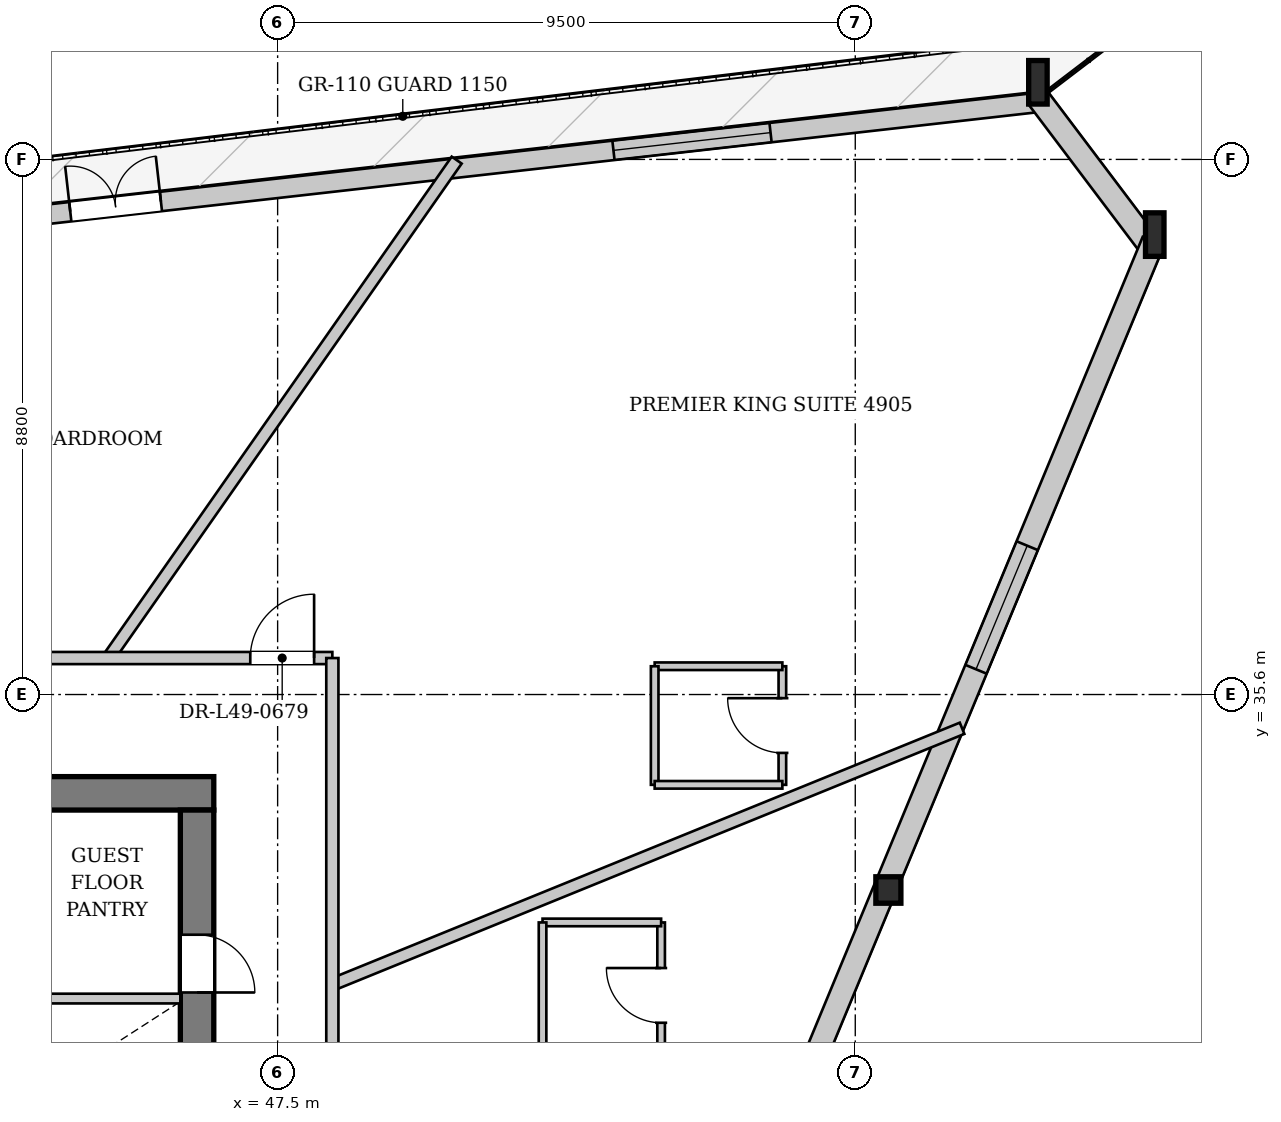
"""IFC4 building model, lengths in metres.
Left out: names, types, materials, properties, quantities, classifications, styles, units other than length and angle.
Written with IfcOpenShell. Run it as: python <this file> out.ifc"""

import sys

from ifc_helpers import new_model, si_unit, direction, frame, frame_2d, origin, origin_2d, place, context, subcontext, project, spatial, rectangle, i_section, extrude, source, transform, mapped, element, fill, save


model = new_model("IFC4")
c1 = context("Model", 3, precision=1e-05, world=origin(), true_north=direction((0.0, 1.0)))
c2 = subcontext(c1, "Body", "Model", "MODEL_VIEW")
j1 = project(units=[si_unit("LENGTHUNIT", "METRE"), si_unit("PLANEANGLEUNIT", "RADIAN")], contexts=[c1])
p1 = place(None, origin())
s1 = spatial("IfcSite", under=j1, at=p1, CompositionType="ELEMENT")
p2 = place(p1, origin())
s2 = spatial("IfcBuilding", under=s1, at=p2, CompositionType="ELEMENT")
p3 = place(p2, frame((0.0, 0.0, 185.65)))
s3 = spatial("IfcBuildingStorey", under=s2, at=p3, CompositionType="ELEMENT", Elevation=185.65)
m1 = source(origin(), c2, "Body", "SweptSolid", [
    extrude(i_section(OverallWidth=0.304, OverallDepth=0.716, WebThickness=0.021, FlangeThickness=0.04, at=origin_2d()), origin(), (0.0, 0.0, 1.0), 3.418),
])
p4 = place(p3, frame((62.079, 42.982, 0.0), z_axis=(-0.089706079585, 0.106418836451, 0.990266555294), x_axis=(-0.764591737576, -0.644514914359, 0.0)))
e1 = element("IfcColumn", 1, at=p4, inside=s3, PredefinedType="COLUMN", context=c2, shape_type="MappedRepresentation", body=[
    mapped(m1, transform((0.0, 0.0, 0.0), x_axis=(1.0, 0.0, 0.0), y_axis=(0.0, 1.0, 0.0), z_axis=(0.0, 0.0, 1.0), scale=1.0)),
])
m2 = source(origin(), c2, "Body", "SweptSolid", [
    extrude(i_section(OverallWidth=0.304, OverallDepth=0.716, WebThickness=0.021, FlangeThickness=0.04, at=origin_2d()), origin(), (0.0, 0.0, 1.0), 3.414),
])
p5 = place(p3, frame((60.165, 45.517, 0.0), z_axis=(-0.094542362552, 0.08882119084, 0.991550572458), x_axis=(-0.684710959005, -0.72881472448, 0.0)))
e2 = element("IfcColumn", 2, at=p5, inside=s3, PredefinedType="COLUMN", context=c2, shape_type="MappedRepresentation", body=[
    mapped(m2, transform((0.0, 0.0, 0.0), x_axis=(1.0, 0.0, 0.0), y_axis=(0.0, 1.0, 0.0), z_axis=(0.0, 0.0, 1.0), scale=1.0)),
])
m3 = source(origin(), c2, "Body", "SweptSolid", [
    extrude(i_section(OverallWidth=0.412, OverallDepth=0.435, WebThickness=0.031, FlangeThickness=0.05, at=origin_2d()), origin(), (0.0, 0.0, 1.0), 3.403),
])
p6 = place(p3, frame((57.621, 32.226, 0.0), z_axis=(-0.045049424917, 0.093470383228, 0.99460235108), x_axis=(-0.900831457079, -0.434168960127, 0.0)))
e3 = element("IfcColumn", 3, at=p6, inside=s3, PredefinedType="COLUMN", context=c2, shape_type="MappedRepresentation", body=[
    mapped(m3, transform((0.0, 0.0, 0.0), x_axis=(1.0, 0.0, 0.0), y_axis=(0.0, 1.0, 0.0), z_axis=(0.0, 0.0, 1.0), scale=1.0)),
])
p7 = place(p3, frame((37.612, 42.808, 0.0), z_axis=(0.0, 0.0, 1.0), x_axis=(0.993680751004, 0.112243329794, 0.0)))
e4 = element("IfcWall", 4, at=p7, inside=s3, PredefinedType="SOLIDWALL", context=c2, shape_type="SweptSolid", body=[
    extrude(rectangle(XDim=22.715, YDim=0.32, at=frame_2d((11.357, 0.0))), origin(), (0.0, 0.0, 1.0), 2.722),
])
p8 = place(p7, frame((6.519, 0.0, 0.0)))
e5 = element("IfcOpeningElement", 5, at=p8, cuts=e4, PredefinedType="OPENING", context=c2, shape_type="SweptSolid", body=[
    extrude(rectangle(XDim=1.5, YDim=2.3, at=frame_2d((0.75, 1.15))), frame((0.0, 0.17, 0.0), z_axis=(0.0, -1.0, 0.0), x_axis=(1.0, 0.0, 0.0)), (0.0, 0.0, 1.0), 0.34),
])
p9 = place(p7, frame((15.509, 0.0, 0.252)))
e6 = element("IfcOpeningElement", 6, at=p9, cuts=e4, PredefinedType="OPENING", context=c2, shape_type="SweptSolid", body=[
    extrude(rectangle(XDim=2.6, YDim=2.35, at=frame_2d((1.3, 1.175))), frame((0.0, 0.17, 0.0), z_axis=(0.0, -1.0, 0.0), x_axis=(1.0, 0.0, 0.0)), (0.0, 0.0, 1.0), 0.34),
])
p10 = place(p3, frame((60.014, 45.402, 0.0), z_axis=(0.0, 0.0, 1.0), x_axis=(0.602530725423, -0.79809568657, 0.0)))
e7 = element("IfcWall", 7, at=p10, inside=s3, PredefinedType="SOLIDWALL", context=c2, shape_type="SweptSolid", body=[
    extrude(rectangle(XDim=3.176, YDim=0.38, at=frame_2d((1.588, 0.0))), origin(), (0.0, 0.0, 1.0), 2.722),
])
p11 = place(p3, frame((61.903, 43.055, 0.0), z_axis=(0.0, 0.0, 1.0), x_axis=(-0.382868163496, -0.923802992732, 0.0)))
e8 = element("IfcWall", 8, at=p11, inside=s3, PredefinedType="SOLIDWALL", context=c2, shape_type="SweptSolid", body=[
    extrude(rectangle(XDim=23.285, YDim=0.38, at=frame_2d((11.643, 0.0))), origin(), (0.0, 0.0, 1.0), 2.722),
])
p12 = place(p11, frame((5.42, 0.0, 0.352)))
e9 = element("IfcOpeningElement", 9, at=p12, cuts=e8, PredefinedType="OPENING", context=c2, shape_type="SweptSolid", body=[
    extrude(rectangle(XDim=2.2, YDim=2.25, at=frame_2d((1.1, 1.125))), frame((0.0, 0.2, 0.0), z_axis=(0.0, -1.0, 0.0), x_axis=(1.0, 0.0, 0.0)), (0.0, 0.0, 1.0), 0.4),
])
p13 = place(p11, frame((15.665, 0.0, 0.352)))
e10 = element("IfcOpeningElement", 10, at=p13, cuts=e8, PredefinedType="OPENING", context=c2, shape_type="SweptSolid", body=[
    extrude(rectangle(XDim=2.2, YDim=2.25, at=frame_2d((1.1, 1.125))), frame((0.0, 0.2, 0.0), z_axis=(0.0, -1.0, 0.0), x_axis=(1.0, 0.0, 0.0)), (0.0, 0.0, 1.0), 0.4),
])
p14 = place(p3, frame((29.55, 33.975, 0.0), z_axis=(0.0, 0.0, 1.0), x_axis=(1.0, 0.0, 0.0)))
e11 = element("IfcWall", 11, at=p14, inside=s3, PredefinedType="SHEAR", context=c2, shape_type="SweptSolid", body=[
    extrude(rectangle(XDim=16.9, YDim=0.55, at=frame_2d((8.45, 0.0))), origin(), (0.0, 0.0, 1.0), 3.33),
])
p15 = place(p14, frame((1.55, 0.0, 0.0)))
e12 = element("IfcOpeningElement", 12, at=p15, cuts=e11, PredefinedType="OPENING", context=c2, shape_type="SweptSolid", body=[
    extrude(rectangle(XDim=0.95, YDim=2.1, at=frame_2d((0.475, 1.05))), frame((0.0, 0.285, 0.0), z_axis=(0.0, -1.0, 0.0), x_axis=(1.0, 0.0, 0.0)), (0.0, 0.0, 1.0), 0.57),
])
p16 = place(p14, frame((3.93, 0.0, 0.0)))
e13 = element("IfcOpeningElement", 13, at=p16, cuts=e11, PredefinedType="OPENING", context=c2, shape_type="SweptSolid", body=[
    extrude(rectangle(XDim=1.32, YDim=2.2, at=frame_2d((0.66, 1.1))), frame((0.0, 0.285, 0.0), z_axis=(0.0, -1.0, 0.0), x_axis=(1.0, 0.0, 0.0)), (0.0, 0.0, 1.0), 0.57),
])
p17 = place(p3, frame((46.175, 33.7, 0.0), z_axis=(0.0, 0.0, 1.0), x_axis=(0.0, -1.0, 0.0)))
e14 = element("IfcWall", 14, at=p17, inside=s3, PredefinedType="SHEAR", context=c2, shape_type="SweptSolid", body=[
    extrude(rectangle(XDim=14.2, YDim=0.55, at=frame_2d((7.1, 0.0))), origin(), (0.0, 0.0, 1.0), 3.33),
])
p18 = place(p17, frame((5.18, 0.0, 0.0)))
e15 = element("IfcOpeningElement", 15, at=p18, cuts=e14, PredefinedType="OPENING", context=c2, shape_type="SweptSolid", body=[
    extrude(rectangle(XDim=1.6, YDim=2.2, at=frame_2d((0.8, 1.1))), frame((0.0, 0.285, 0.0), z_axis=(0.0, -1.0, 0.0), x_axis=(1.0, 0.0, 0.0)), (0.0, 0.0, 1.0), 0.57),
])
p19 = place(p17, frame((2.05, 0.0, 0.0)))
e16 = element("IfcOpeningElement", 16, at=p19, cuts=e14, PredefinedType="OPENING", context=c2, shape_type="SweptSolid", body=[
    extrude(rectangle(XDim=0.95, YDim=2.1, at=frame_2d((0.475, 1.05))), frame((0.0, 0.285, 0.0), z_axis=(0.0, -1.0, 0.0), x_axis=(1.0, 0.0, 0.0)), (0.0, 0.0, 1.0), 0.57),
])
p20 = place(p3, frame((40.72, 30.6, 0.0), z_axis=(0.0, 0.0, 1.0), x_axis=(1.0, 0.0, 0.0)))
e17 = element("IfcWall", 17, at=p20, inside=s3, PredefinedType="PARTITIONING", context=c2, shape_type="SweptSolid", body=[
    extrude(rectangle(XDim=5.18, YDim=0.16, at=frame_2d((2.59, 0.0))), origin(), (0.0, 0.0, 1.0), 3.33),
])
p21 = place(p3, frame((48.4, 30.831, 0.0), z_axis=(0.0, 0.0, 1.0), x_axis=(0.926275636958, 0.376846712042, 0.0)))
e18 = element("IfcWall", 18, at=p21, inside=s3, PredefinedType="PARTITIONING", context=c2, shape_type="SweptSolid", body=[
    extrude(rectangle(XDim=11.181, YDim=0.2, at=frame_2d((5.591, 0.0))), origin(), (0.0, 0.0, 1.0), 3.33),
])
p22 = place(p3, frame((44.716, 36.2, 0.0), z_axis=(0.0, 0.0, 1.0), x_axis=(0.573232775322, 0.819392570931, 0.0)))
e19 = element("IfcWall", 19, at=p22, inside=s3, PredefinedType="PARTITIONING", context=c2, shape_type="SweptSolid", body=[
    extrude(rectangle(XDim=9.993, YDim=0.2, at=frame_2d((4.997, 0.0))), origin(), (0.0, 0.0, 1.0), 3.33),
])
p23 = place(p3, frame((53.807, 29.452, 0.0), z_axis=(0.0, 0.0, 1.0), x_axis=(0.0, 1.0, 0.0)))
e20 = element("IfcWall", 20, at=p23, inside=s3, PredefinedType="PARTITIONING", context=c2, shape_type="SweptSolid", body=[
    extrude(rectangle(XDim=2.4, YDim=0.125, at=frame_2d((1.2, 0.0))), origin(), (0.0, 0.0, 1.0), 3.33),
])
p24 = place(p23, frame((0.75, 0.0, 0.0)))
e21 = element("IfcOpeningElement", 21, at=p24, cuts=e20, PredefinedType="OPENING", context=c2, shape_type="SweptSolid", body=[
    extrude(rectangle(XDim=0.9, YDim=2.1, at=frame_2d((0.45, 1.05))), frame((0.0, 0.073, 0.0), z_axis=(0.0, -1.0, 0.0), x_axis=(1.0, 0.0, 0.0)), (0.0, 0.0, 1.0), 0.145),
])
p25 = place(p3, frame((53.807, 31.852, 0.0), z_axis=(0.0, 0.0, 1.0), x_axis=(-1.0, 0.0, 0.0)))
e22 = element("IfcWall", 22, at=p25, inside=s3, PredefinedType="PARTITIONING", context=c2, shape_type="SweptSolid", body=[
    extrude(rectangle(XDim=1.95, YDim=0.125, at=frame_2d((0.975, 0.0))), origin(), (0.0, 0.0, 1.0), 3.33),
])
p26 = place(p3, frame((51.857, 31.852, 0.0), z_axis=(0.0, 0.0, 1.0), x_axis=(0.0, -1.0, 0.0)))
e23 = element("IfcWall", 23, at=p26, inside=s3, PredefinedType="PARTITIONING", context=c2, shape_type="SweptSolid", body=[
    extrude(rectangle(XDim=2.4, YDim=0.125, at=frame_2d((1.2, 0.0))), origin(), (0.0, 0.0, 1.0), 3.33),
])
p27 = place(p3, frame((55.801, 34.115, 0.0), z_axis=(0.0, 0.0, 1.0), x_axis=(0.0, 1.0, 0.0)))
e24 = element("IfcWall", 24, at=p27, inside=s3, PredefinedType="PARTITIONING", context=c2, shape_type="SweptSolid", body=[
    extrude(rectangle(XDim=1.95, YDim=0.125, at=frame_2d((0.975, 0.0))), origin(), (0.0, 0.0, 1.0), 3.33),
])
p28 = place(p27, frame((0.525, 0.0, 0.0)))
e25 = element("IfcOpeningElement", 25, at=p28, cuts=e24, PredefinedType="OPENING", context=c2, shape_type="SweptSolid", body=[
    extrude(rectangle(XDim=0.9, YDim=2.1, at=frame_2d((0.45, 1.05))), frame((0.0, 0.073, 0.0), z_axis=(0.0, -1.0, 0.0), x_axis=(1.0, 0.0, 0.0)), (0.0, 0.0, 1.0), 0.145),
])
p29 = place(p3, frame((55.801, 36.065, 0.0), z_axis=(0.0, 0.0, 1.0), x_axis=(-1.0, 0.0, 0.0)))
e26 = element("IfcWall", 26, at=p29, inside=s3, PredefinedType="PARTITIONING", context=c2, shape_type="SweptSolid", body=[
    extrude(rectangle(XDim=2.1, YDim=0.125, at=frame_2d((1.05, 0.0))), origin(), (0.0, 0.0, 1.0), 3.33),
])
p30 = place(p3, frame((53.701, 36.065, 0.0), z_axis=(0.0, 0.0, 1.0), x_axis=(0.0, -1.0, 0.0)))
e27 = element("IfcWall", 27, at=p30, inside=s3, PredefinedType="PARTITIONING", context=c2, shape_type="SweptSolid", body=[
    extrude(rectangle(XDim=1.95, YDim=0.125, at=frame_2d((0.975, 0.0))), origin(), (0.0, 0.0, 1.0), 3.33),
])
p31 = place(p3, frame((53.701, 34.115, 0.0), z_axis=(0.0, 0.0, 1.0), x_axis=(1.0, 0.0, 0.0)))
e28 = element("IfcWall", 28, at=p31, inside=s3, PredefinedType="PARTITIONING", context=c2, shape_type="SweptSolid", body=[
    extrude(rectangle(XDim=2.1, YDim=0.125, at=frame_2d((1.05, 0.0))), origin(), (0.0, 0.0, 1.0), 3.33),
])
p32 = place(p3, frame((43.4, 36.2, 0.0), z_axis=(0.0, 0.0, 1.0), x_axis=(1.0, 0.0, 0.0)))
e29 = element("IfcWall", 29, at=p32, inside=s3, PredefinedType="PARTITIONING", context=c2, shape_type="SweptSolid", body=[
    extrude(rectangle(XDim=5.0, YDim=0.2, at=frame_2d((2.5, 0.0))), origin(), (0.0, 0.0, 1.0), 3.33),
])
p33 = place(p32, frame((3.65, 0.0, 0.0)))
e30 = element("IfcOpeningElement", 30, at=p33, cuts=e29, PredefinedType="OPENING", context=c2, shape_type="SweptSolid", body=[
    extrude(rectangle(XDim=1.05, YDim=2.2, at=frame_2d((0.525, 1.1))), frame((0.0, 0.11, 0.0), z_axis=(0.0, -1.0, 0.0), x_axis=(1.0, 0.0, 0.0)), (0.0, 0.0, 1.0), 0.22),
])
p34 = place(p3, frame((48.4, 17.0, 0.0), z_axis=(0.0, 0.0, 1.0), x_axis=(0.0, 1.0, 0.0)))
e31 = element("IfcWall", 31, at=p34, inside=s3, PredefinedType="PARTITIONING", context=c2, shape_type="SweptSolid", body=[
    extrude(rectangle(XDim=19.2, YDim=0.2, at=frame_2d((9.6, 0.0))), origin(), (0.0, 0.0, 1.0), 3.33),
])
p35 = place(p34, frame((1.794, 0.0, 0.0)))
e32 = element("IfcOpeningElement", 32, at=p35, cuts=e31, PredefinedType="OPENING", context=c2, shape_type="SweptSolid", body=[
    extrude(rectangle(XDim=1.05, YDim=2.2, at=frame_2d((0.525, 1.1))), frame((0.0, 0.11, 0.0), z_axis=(0.0, -1.0, 0.0), x_axis=(1.0, 0.0, 0.0)), (0.0, 0.0, 1.0), 0.22),
])
p36 = place(p34, frame((9.465, 0.0, 0.0)))
e33 = element("IfcOpeningElement", 33, at=p36, cuts=e31, PredefinedType="OPENING", context=c2, shape_type="SweptSolid", body=[
    extrude(rectangle(XDim=1.05, YDim=2.2, at=frame_2d((0.525, 1.1))), frame((0.0, 0.11, 0.0), z_axis=(0.0, -1.0, 0.0), x_axis=(1.0, 0.0, 0.0)), (0.0, 0.0, 1.0), 0.22),
])
m4 = source(origin(), c2, "Body", "SweptSolid", [
    extrude(rectangle(XDim=1.5, YDim=2.3, at=frame_2d((0.75, 1.15))), frame((0.0, 0.025, 0.0), z_axis=(0.0, -1.0, 0.0), x_axis=(1.0, 0.0, 0.0)), (0.0, 0.0, 1.0), 0.05),
])
p37 = place(p8, origin())
e34 = element("IfcDoor", 34, at=p37, inside=s3, OperationType="DOUBLE_DOOR_SINGLE_SWING", PredefinedType="DOOR", context=c2, shape_type="MappedRepresentation", body=[
    mapped(m4, transform((0.0, 0.0, 0.0), x_axis=(1.0, 0.0, 0.0), y_axis=(0.0, 1.0, 0.0), z_axis=(0.0, 0.0, 1.0), scale=1.0)),
])
fill(e5, e34)
m5 = source(origin(), c2, "Body", "SweptSolid", [
    extrude(rectangle(XDim=2.6, YDim=2.35, at=frame_2d((1.3, 1.175))), frame((0.0, 0.03, 0.0), z_axis=(0.0, -1.0, 0.0), x_axis=(1.0, 0.0, 0.0)), (0.0, 0.0, 1.0), 0.06),
])
p38 = place(p9, origin())
e35 = element("IfcWindow", 35, at=p38, inside=s3, PartitioningType="SINGLE_PANEL", PredefinedType="WINDOW", context=c2, shape_type="MappedRepresentation", body=[
    mapped(m5, transform((0.0, 0.0, 0.0), x_axis=(1.0, 0.0, 0.0), y_axis=(0.0, 1.0, 0.0), z_axis=(0.0, 0.0, 1.0), scale=1.0)),
])
fill(e6, e35)
m6 = source(origin(), c2, "Body", "SweptSolid", [
    extrude(rectangle(XDim=2.2, YDim=2.25, at=frame_2d((1.1, 1.125))), frame((0.0, 0.03, 0.0), z_axis=(0.0, -1.0, 0.0), x_axis=(1.0, 0.0, 0.0)), (0.0, 0.0, 1.0), 0.06),
])
p39 = place(p12, origin())
e36 = element("IfcWindow", 36, at=p39, inside=s3, PartitioningType="SINGLE_PANEL", PredefinedType="WINDOW", context=c2, shape_type="MappedRepresentation", body=[
    mapped(m6, transform((0.0, 0.0, 0.0), x_axis=(1.0, 0.0, 0.0), y_axis=(0.0, 1.0, 0.0), z_axis=(0.0, 0.0, 1.0), scale=1.0)),
])
fill(e9, e36)
m7 = source(origin(), c2, "Body", "SweptSolid", [
    extrude(rectangle(XDim=0.95, YDim=2.1, at=frame_2d((0.475, 1.05))), frame((0.0, 0.025, 0.0), z_axis=(0.0, -1.0, 0.0), x_axis=(1.0, 0.0, 0.0)), (0.0, 0.0, 1.0), 0.05),
])
p40 = place(p19, origin())
e37 = element("IfcDoor", 37, at=p40, inside=s3, OperationType="SINGLE_SWING_RIGHT", PredefinedType="DOOR", context=c2, shape_type="MappedRepresentation", body=[
    mapped(m7, transform((0.0, 0.0, 0.0), x_axis=(1.0, 0.0, 0.0), y_axis=(0.0, 1.0, 0.0), z_axis=(0.0, 0.0, 1.0), scale=1.0)),
])
fill(e16, e37)
m8 = source(origin(), c2, "Body", "SweptSolid", [
    extrude(rectangle(XDim=0.9, YDim=2.1, at=frame_2d((0.45, 1.05))), frame((0.0, 0.025, 0.0), z_axis=(0.0, -1.0, 0.0), x_axis=(1.0, 0.0, 0.0)), (0.0, 0.0, 1.0), 0.05),
])
p41 = place(p24, origin())
e38 = element("IfcDoor", 38, at=p41, inside=s3, OperationType="SINGLE_SWING_RIGHT", PredefinedType="DOOR", context=c2, shape_type="MappedRepresentation", body=[
    mapped(m8, transform((0.0, 0.0, 0.0), x_axis=(1.0, 0.0, 0.0), y_axis=(0.0, 1.0, 0.0), z_axis=(0.0, 0.0, 1.0), scale=1.0)),
])
fill(e21, e38)
p42 = place(p28, origin())
e39 = element("IfcDoor", 39, at=p42, inside=s3, OperationType="SINGLE_SWING_RIGHT", PredefinedType="DOOR", context=c2, shape_type="MappedRepresentation", body=[
    mapped(m8, transform((0.0, 0.0, 0.0), x_axis=(1.0, 0.0, 0.0), y_axis=(0.0, 1.0, 0.0), z_axis=(0.0, 0.0, 1.0), scale=1.0)),
])
fill(e25, e39)
m9 = source(origin(), c2, "Body", "SweptSolid", [
    extrude(rectangle(XDim=1.05, YDim=2.2, at=frame_2d((0.525, 1.1))), frame((0.0, 0.025, 0.0), z_axis=(0.0, -1.0, 0.0), x_axis=(1.0, 0.0, 0.0)), (0.0, 0.0, 1.0), 0.05),
])
p43 = place(p33, origin())
e40 = element("IfcDoor", 40, at=p43, inside=s3, OperationType="SINGLE_SWING_RIGHT", PredefinedType="DOOR", context=c2, shape_type="MappedRepresentation", body=[
    mapped(m9, transform((0.0, 0.0, 0.0), x_axis=(1.0, 0.0, 0.0), y_axis=(0.0, 1.0, 0.0), z_axis=(0.0, 0.0, 1.0), scale=1.0)),
])
fill(e30, e40)
save(model, sys.argv[1])
